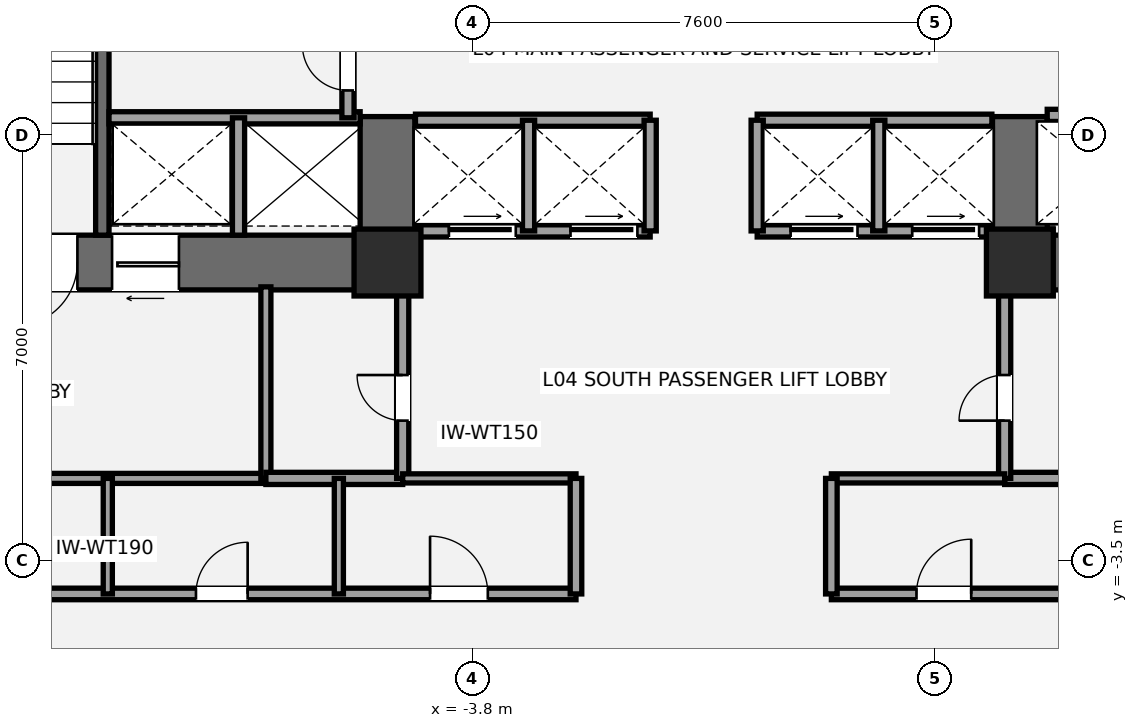
"""IFC4 building model, lengths in metres.
Left out: names, types, materials, properties, quantities, classifications, styles, units other than length and angle.
Written with IfcOpenShell. Run it as: python <this file> out.ifc"""

import sys

from ifc_helpers import new_model, si_unit, direction, frame, frame_2d, origin, origin_2d, place, context, subcontext, project, spatial, rectangle, extrude, element, fill, save


model = new_model("IFC4")
c1 = context("Model", 3, precision=1e-05, world=origin(), true_north=direction((0.0, 1.0)))
c2 = subcontext(c1, "Body", "Model", "MODEL_VIEW")
j1 = project(units=[si_unit("LENGTHUNIT", "METRE"), si_unit("PLANEANGLEUNIT", "RADIAN")], contexts=[c1])
p1 = place(None, origin())
s1 = spatial("IfcSite", under=j1, at=p1, CompositionType="ELEMENT")
p2 = place(p1, origin())
s2 = spatial("IfcBuilding", under=s1, at=p2, CompositionType="ELEMENT")
p3 = place(p2, frame((0.0, 0.0, 18.6)))
s3 = spatial("IfcBuildingStorey", under=s2, at=p3, CompositionType="ELEMENT", Elevation=18.6)
p4 = place(p3, frame((-4.75, 1.4, 0.0), z_axis=(0.0, 0.0, 1.0), x_axis=(-1.0, 0.0, 0.0)))
e1 = element("IfcWall", 1, at=p4, inside=s3, PredefinedType="SHEAR", context=c2, shape_type="SweptSolid", body=[
    extrude(rectangle(XDim=9.3, YDim=0.9, at=frame_2d((4.65, 0.0))), origin(), (0.0, 0.0, 1.0), 4.2),
])
p5 = place(p4, frame((5.55, 0.0, 0.0)))
e2 = element("IfcOpeningElement", 2, at=p5, cuts=e1, PredefinedType="OPENING", context=c2, shape_type="SweptSolid", body=[
    extrude(rectangle(XDim=1.05, YDim=2.15, at=frame_2d((0.525, 1.075))), frame((0.0, 0.46, 0.0), z_axis=(0.0, -1.0, 0.0), x_axis=(1.0, 0.0, 0.0)), (0.0, 0.0, 1.0), 0.92),
])
p6 = place(p4, frame((3.88, 0.0, 0.0)))
e3 = element("IfcOpeningElement", 3, at=p6, cuts=e1, PredefinedType="OPENING", context=c2, shape_type="SweptSolid", body=[
    extrude(rectangle(XDim=1.1, YDim=2.2, at=frame_2d((0.55, 1.1))), frame((0.0, 0.46, 0.0), z_axis=(0.0, -1.0, 0.0), x_axis=(1.0, 0.0, 0.0)), (0.0, 0.0, 1.0), 0.92),
])
p7 = place(p3, frame((-5.2, 0.95, 0.0), z_axis=(0.0, 0.0, 1.0), x_axis=(0.0, 1.0, 0.0)))
e4 = element("IfcWall", 4, at=p7, inside=s3, PredefinedType="SHEAR", context=c2, shape_type="SweptSolid", body=[
    extrude(rectangle(XDim=2.85, YDim=0.9, at=frame_2d((1.425, 0.0))), origin(), (0.0, 0.0, 1.0), 4.2),
])
p8 = place(p3, frame((-9.89, 1.85, 0.0), z_axis=(0.0, 0.0, 1.0), x_axis=(0.0, 1.0, 0.0)))
e5 = element("IfcWall", 5, at=p8, inside=s3, PredefinedType="SHEAR", context=c2, shape_type="SweptSolid", body=[
    extrude(rectangle(XDim=7.15, YDim=0.22, at=frame_2d((3.575, 0.0))), origin(), (0.0, 0.0, 1.0), 4.2),
])
p9 = place(p3, frame((14.05, 1.4, 0.0), z_axis=(0.0, 0.0, 1.0), x_axis=(-1.0, 0.0, 0.0)))
e6 = element("IfcWall", 6, at=p9, inside=s3, PredefinedType="SHEAR", context=c2, shape_type="SweptSolid", body=[
    extrude(rectangle(XDim=9.3, YDim=0.9, at=frame_2d((4.65, 0.0))), origin(), (0.0, 0.0, 1.0), 4.2),
])
p10 = place(p9, frame((2.7, 0.0, 0.0)))
e7 = element("IfcOpeningElement", 7, at=p10, cuts=e6, PredefinedType="OPENING", context=c2, shape_type="SweptSolid", body=[
    extrude(rectangle(XDim=1.05, YDim=2.15, at=frame_2d((0.525, 1.075))), frame((0.0, 0.46, 0.0), z_axis=(0.0, -1.0, 0.0), x_axis=(1.0, 0.0, 0.0)), (0.0, 0.0, 1.0), 0.92),
])
p11 = place(p9, frame((4.7, 0.0, 0.0)))
e8 = element("IfcOpeningElement", 8, at=p11, cuts=e6, PredefinedType="OPENING", context=c2, shape_type="SweptSolid", body=[
    extrude(rectangle(XDim=1.1, YDim=2.2, at=frame_2d((0.55, 1.1))), frame((0.0, 0.46, 0.0), z_axis=(0.0, -1.0, 0.0), x_axis=(1.0, 0.0, 0.0)), (0.0, 0.0, 1.0), 0.92),
])
p12 = place(p3, frame((5.2, 0.95, 0.0), z_axis=(0.0, 0.0, 1.0), x_axis=(0.0, 1.0, 0.0)))
e9 = element("IfcWall", 9, at=p12, inside=s3, PredefinedType="SHEAR", context=c2, shape_type="SweptSolid", body=[
    extrude(rectangle(XDim=2.85, YDim=0.9, at=frame_2d((1.425, 0.0))), origin(), (0.0, 0.0, 1.0), 4.2),
])
for number, where, z_axis, x_axis in (
    (10, (-5.2, 1.4, 0.0), (0.0, 0.0, 1.0), (1.0, 0.0, 0.0)),
    (11, (5.2, 1.4, 0.0), (0.0, 0.0, 1.0), (1.0, 0.0, 0.0)),
):
    element("IfcColumn", number, at=place(p3, frame(where, z_axis=z_axis, x_axis=x_axis)), inside=s3, PredefinedType="COLUMN", context=c2, shape_type="SweptSolid", body=[
        extrude(rectangle(XDim=1.1, YDim=1.1, at=origin_2d()), origin(), (0.0, 0.0, 1.0), 4.2),
    ])
p13 = place(p3, frame((-13.45, -2.15, 0.0), z_axis=(0.0, 0.0, 1.0), x_axis=(1.0, 0.0, 0.0)))
e12 = element("IfcWall", 12, at=p13, inside=s3, PredefinedType="PARTITIONING", context=c2, shape_type="SweptSolid", body=[
    extrude(rectangle(XDim=6.25, YDim=0.165, at=frame_2d((3.125, 0.0))), origin(), (0.0, 0.0, 1.0), 3.98),
])
p14 = place(p3, frame((-7.2, -2.15, 0.0), z_axis=(0.0, 0.0, 1.0), x_axis=(0.0, 1.0, 0.0)))
e13 = element("IfcWall", 13, at=p14, inside=s3, PredefinedType="PARTITIONING", context=c2, shape_type="SweptSolid", body=[
    extrude(rectangle(XDim=3.15, YDim=0.165, at=frame_2d((1.575, 0.0))), origin(), (0.0, 0.0, 1.0), 3.98),
])
p15 = place(p3, frame((-7.2, -2.15, 0.0), z_axis=(0.0, 0.0, 1.0), x_axis=(1.0, 0.0, 0.0)))
e14 = element("IfcWall", 14, at=p15, inside=s3, PredefinedType="SOLIDWALL", context=c2, shape_type="SweptSolid", body=[
    extrude(rectangle(XDim=2.25, YDim=0.2, at=frame_2d((1.125, 0.0))), origin(), (0.0, 0.0, 1.0), 3.98),
])
p16 = place(p3, frame((-4.95, -2.15, 0.0), z_axis=(0.0, 0.0, 1.0), x_axis=(0.0, 1.0, 0.0)))
e15 = element("IfcWall", 15, at=p16, inside=s3, PredefinedType="SOLIDWALL", context=c2, shape_type="SweptSolid", body=[
    extrude(rectangle(XDim=3.15, YDim=0.2, at=frame_2d((1.575, 0.0))), origin(), (0.0, 0.0, 1.0), 3.348),
])
p17 = place(p16, frame((0.95, 0.0, 0.0)))
e16 = element("IfcOpeningElement", 16, at=p17, cuts=e15, PredefinedType="OPENING", context=c2, shape_type="SweptSolid", body=[
    extrude(rectangle(XDim=0.75, YDim=2.1, at=frame_2d((0.375, 1.05))), frame((0.0, 0.11, 0.0), z_axis=(0.0, -1.0, 0.0), x_axis=(1.0, 0.0, 0.0)), (0.0, 0.0, 1.0), 0.22),
])
p18 = place(p3, frame((4.95, -2.15, 0.0), z_axis=(0.0, 0.0, 1.0), x_axis=(1.0, 0.0, 0.0)))
e17 = element("IfcWall", 17, at=p18, inside=s3, PredefinedType="SOLIDWALL", context=c2, shape_type="SweptSolid", body=[
    extrude(rectangle(XDim=2.25, YDim=0.2, at=frame_2d((1.125, 0.0))), origin(), (0.0, 0.0, 1.0), 3.98),
])
p19 = place(p3, frame((4.95, -2.15, 0.0), z_axis=(0.0, 0.0, 1.0), x_axis=(0.0, 1.0, 0.0)))
e18 = element("IfcWall", 18, at=p19, inside=s3, PredefinedType="SOLIDWALL", context=c2, shape_type="SweptSolid", body=[
    extrude(rectangle(XDim=3.15, YDim=0.2, at=frame_2d((1.575, 0.0))), origin(), (0.0, 0.0, 1.0), 3.348),
])
p20 = place(p19, frame((0.95, 0.0, 0.0)))
e19 = element("IfcOpeningElement", 19, at=p20, cuts=e18, PredefinedType="OPENING", context=c2, shape_type="SweptSolid", body=[
    extrude(rectangle(XDim=0.75, YDim=2.1, at=frame_2d((0.375, 1.05))), frame((0.0, 0.11, 0.0), z_axis=(0.0, -1.0, 0.0), x_axis=(1.0, 0.0, 0.0)), (0.0, 0.0, 1.0), 0.22),
])
p21 = place(p3, frame((-9.78, 3.78, 0.0), z_axis=(0.0, 0.0, 1.0), x_axis=(1.0, 0.0, 0.0)))
e20 = element("IfcWall", 20, at=p21, inside=s3, PredefinedType="SOLIDWALL", context=c2, shape_type="SweptSolid", body=[
    extrude(rectangle(XDim=4.13, YDim=0.2, at=frame_2d((2.065, 0.0))), origin(), (0.0, 0.0, 1.0), 3.98),
])
p22 = place(p3, frame((-7.65, 1.85, 0.0), z_axis=(0.0, 0.0, 1.0), x_axis=(0.0, 1.0, 0.0)))
e21 = element("IfcWall", 21, at=p22, inside=s3, PredefinedType="SOLIDWALL", context=c2, shape_type="SweptSolid", body=[
    extrude(rectangle(XDim=1.93, YDim=0.2, at=frame_2d((0.965, 0.0))), origin(), (0.0, 0.0, 1.0), 3.98),
])
p23 = place(p3, frame((-5.85, 3.78, 0.0), z_axis=(0.0, 0.0, 1.0), x_axis=(0.0, 1.0, 0.0)))
e22 = element("IfcWall", 22, at=p23, inside=s3, PredefinedType="SOLIDWALL", context=c2, shape_type="SweptSolid", body=[
    extrude(rectangle(XDim=1.69, YDim=0.2, at=frame_2d((0.845, 0.0))), origin(), (0.0, 0.0, 1.0), 3.98),
])
p24 = place(p23, frame((0.45, 0.0, 0.0)))
e23 = element("IfcOpeningElement", 23, at=p24, cuts=e22, PredefinedType="OPENING", context=c2, shape_type="SweptSolid", body=[
    extrude(rectangle(XDim=0.75, YDim=2.1, at=frame_2d((0.375, 1.05))), frame((0.0, 0.11, 0.0), z_axis=(0.0, -1.0, 0.0), x_axis=(1.0, 0.0, 0.0)), (0.0, 0.0, 1.0), 0.22),
])
p25 = place(p3, frame((5.65, 3.82, 0.0), z_axis=(0.0, 0.0, 1.0), x_axis=(1.0, 0.0, 0.0)))
e24 = element("IfcWall", 24, at=p25, inside=s3, PredefinedType="SOLIDWALL", context=c2, shape_type="SweptSolid", body=[
    extrude(rectangle(XDim=4.13, YDim=0.2, at=frame_2d((2.065, 0.0))), origin(), (0.0, 0.0, 1.0), 3.98),
])
p26 = place(p25, frame((0.65, 0.0, 0.0)))
e25 = element("IfcOpeningElement", 25, at=p26, cuts=e24, PredefinedType="OPENING", context=c2, shape_type="SweptSolid", body=[
    extrude(rectangle(XDim=1.2, YDim=2.2, at=frame_2d((0.6, 1.1))), frame((0.0, 0.11, 0.0), z_axis=(0.0, -1.0, 0.0), x_axis=(1.0, 0.0, 0.0)), (0.0, 0.0, 1.0), 0.22),
])
p27 = place(p3, frame((-4.74, 1.92, 0.0), z_axis=(0.0, 0.0, 1.0), x_axis=(1.0, 0.0, 0.0)))
e26 = element("IfcWall", 26, at=p27, inside=s3, PredefinedType="SOLIDWALL", context=c2, shape_type="SweptSolid", body=[
    extrude(rectangle(XDim=3.86, YDim=0.2, at=frame_2d((1.93, 0.0))), origin(), (0.0, 0.0, 1.0), 2.97),
])
p28 = place(p27, frame((0.55, 0.0, 0.0)))
e27 = element("IfcOpeningElement", 27, at=p28, cuts=e26, PredefinedType="OPENING", context=c2, shape_type="SweptSolid", body=[
    extrude(rectangle(XDim=1.1, YDim=2.2, at=frame_2d((0.55, 1.1))), frame((0.0, 0.11, 0.0), z_axis=(0.0, -1.0, 0.0), x_axis=(1.0, 0.0, 0.0)), (0.0, 0.0, 1.0), 0.22),
])
p29 = place(p27, frame((2.55, 0.0, 0.0)))
e28 = element("IfcOpeningElement", 28, at=p29, cuts=e26, PredefinedType="OPENING", context=c2, shape_type="SweptSolid", body=[
    extrude(rectangle(XDim=1.1, YDim=2.2, at=frame_2d((0.55, 1.1))), frame((0.0, 0.11, 0.0), z_axis=(0.0, -1.0, 0.0), x_axis=(1.0, 0.0, 0.0)), (0.0, 0.0, 1.0), 0.22),
])
p30 = place(p3, frame((0.88, 1.92, 0.0), z_axis=(0.0, 0.0, 1.0), x_axis=(1.0, 0.0, 0.0)))
e29 = element("IfcWall", 29, at=p30, inside=s3, PredefinedType="SOLIDWALL", context=c2, shape_type="SweptSolid", body=[
    extrude(rectangle(XDim=3.86, YDim=0.2, at=frame_2d((1.93, 0.0))), origin(), (0.0, 0.0, 1.0), 2.97),
])
p31 = place(p30, frame((0.55, 0.0, 0.0)))
e30 = element("IfcOpeningElement", 30, at=p31, cuts=e29, PredefinedType="OPENING", context=c2, shape_type="SweptSolid", body=[
    extrude(rectangle(XDim=1.1, YDim=2.2, at=frame_2d((0.55, 1.1))), frame((0.0, 0.11, 0.0), z_axis=(0.0, -1.0, 0.0), x_axis=(1.0, 0.0, 0.0)), (0.0, 0.0, 1.0), 0.22),
])
p32 = place(p30, frame((2.55, 0.0, 0.0)))
e31 = element("IfcOpeningElement", 31, at=p32, cuts=e29, PredefinedType="OPENING", context=c2, shape_type="SweptSolid", body=[
    extrude(rectangle(XDim=1.1, YDim=2.2, at=frame_2d((0.55, 1.1))), frame((0.0, 0.11, 0.0), z_axis=(0.0, -1.0, 0.0), x_axis=(1.0, 0.0, 0.0)), (0.0, 0.0, 1.0), 0.22),
])
for number, where, z_axis, x_axis in (
    (32, (-4.74, 3.74, 0.0), (0.0, 0.0, 1.0), (1.0, 0.0, 0.0)),
    (33, (0.88, 3.74, 0.0), (0.0, 0.0, 1.0), (1.0, 0.0, 0.0)),
):
    element("IfcWall", number, at=place(p3, frame(where, z_axis=z_axis, x_axis=x_axis)), inside=s3, PredefinedType="SOLIDWALL", context=c2, shape_type="SweptSolid", body=[
        extrude(rectangle(XDim=3.86, YDim=0.2, at=frame_2d((1.93, 0.0))), origin(), (0.0, 0.0, 1.0), 3.98),
    ])
for number, where, z_axis, x_axis in (
    (34, (-2.88, 1.92, 0.0), (0.0, 0.0, 1.0), (0.0, 1.0, 0.0)),
    (35, (2.88, 1.92, 0.0), (0.0, 0.0, 1.0), (0.0, 1.0, 0.0)),
    (36, (-0.88, 1.92, 0.0), (0.0, 0.0, 1.0), (0.0, 1.0, 0.0)),
    (37, (0.88, 1.92, 0.0), (0.0, 0.0, 1.0), (0.0, 1.0, 0.0)),
):
    element("IfcWall", number, at=place(p3, frame(where, z_axis=z_axis, x_axis=x_axis)), inside=s3, PredefinedType="SOLIDWALL", context=c2, shape_type="SweptSolid", body=[
        extrude(rectangle(XDim=1.82, YDim=0.2, at=frame_2d((0.91, 0.0))), origin(), (0.0, 0.0, 1.0), 3.98),
    ])
p33 = place(p3, frame((-13.45, -4.05, 0.0), z_axis=(0.0, 0.0, 1.0), x_axis=(1.0, 0.0, 0.0)))
e38 = element("IfcWall", 38, at=p33, inside=s3, PredefinedType="PLUMBINGWALL", context=c2, shape_type="SweptSolid", body=[
    extrude(rectangle(XDim=11.35, YDim=0.19, at=frame_2d((5.675, 0.0))), origin(), (0.0, 0.0, 1.0), 3.507),
])
p34 = place(p33, frame((1.25, 0.0, 0.0)))
e39 = element("IfcOpeningElement", 39, at=p34, cuts=e38, PredefinedType="OPENING", context=c2, shape_type="SweptSolid", body=[
    extrude(rectangle(XDim=0.85, YDim=2.1, at=frame_2d((0.425, 1.05))), frame((0.0, 0.105, 0.0), z_axis=(0.0, -1.0, 0.0), x_axis=(1.0, 0.0, 0.0)), (0.0, 0.0, 1.0), 0.21),
])
p35 = place(p33, frame((5.1, 0.0, 0.0)))
e40 = element("IfcOpeningElement", 40, at=p35, cuts=e38, PredefinedType="OPENING", context=c2, shape_type="SweptSolid", body=[
    extrude(rectangle(XDim=0.85, YDim=2.1, at=frame_2d((0.425, 1.05))), frame((0.0, 0.105, 0.0), z_axis=(0.0, -1.0, 0.0), x_axis=(1.0, 0.0, 0.0)), (0.0, 0.0, 1.0), 0.21),
])
p36 = place(p33, frame((8.95, 0.0, 0.0)))
e41 = element("IfcOpeningElement", 41, at=p36, cuts=e38, PredefinedType="OPENING", context=c2, shape_type="SweptSolid", body=[
    extrude(rectangle(XDim=0.95, YDim=2.15, at=frame_2d((0.475, 1.075))), frame((0.0, 0.105, 0.0), z_axis=(0.0, -1.0, 0.0), x_axis=(1.0, 0.0, 0.0)), (0.0, 0.0, 1.0), 0.21),
])
p37 = place(p3, frame((-4.95, -2.15, 0.0), z_axis=(0.0, 0.0, 1.0), x_axis=(1.0, 0.0, 0.0)))
e42 = element("IfcWall", 42, at=p37, inside=s3, PredefinedType="PLUMBINGWALL", context=c2, shape_type="SweptSolid", body=[
    extrude(rectangle(XDim=2.85, YDim=0.15, at=frame_2d((1.425, 0.0))), origin(), (0.0, 0.0, 1.0), 3.98),
])
p38 = place(p3, frame((-2.1, -4.05, 0.0), z_axis=(0.0, 0.0, 1.0), x_axis=(0.0, 1.0, 0.0)))
e43 = element("IfcWall", 43, at=p38, inside=s3, PredefinedType="PLUMBINGWALL", context=c2, shape_type="SweptSolid", body=[
    extrude(rectangle(XDim=1.9, YDim=0.19, at=frame_2d((0.95, 0.0))), origin(), (0.0, 0.0, 1.0), 3.98),
])
p39 = place(p3, frame((-9.8, -4.05, 0.0), z_axis=(0.0, 0.0, 1.0), x_axis=(0.0, 1.0, 0.0)))
e44 = element("IfcWall", 44, at=p39, inside=s3, PredefinedType="PLUMBINGWALL", context=c2, shape_type="SweptSolid", body=[
    extrude(rectangle(XDim=1.9, YDim=0.15, at=frame_2d((0.95, 0.0))), origin(), (0.0, 0.0, 1.0), 3.98),
])
p40 = place(p3, frame((-6.0, -4.05, 0.0), z_axis=(0.0, 0.0, 1.0), x_axis=(0.0, 1.0, 0.0)))
e45 = element("IfcWall", 45, at=p40, inside=s3, PredefinedType="PLUMBINGWALL", context=c2, shape_type="SweptSolid", body=[
    extrude(rectangle(XDim=1.9, YDim=0.15, at=frame_2d((0.95, 0.0))), origin(), (0.0, 0.0, 1.0), 3.348),
])
p41 = place(p3, frame((2.1, -4.05, 0.0), z_axis=(0.0, 0.0, 1.0), x_axis=(1.0, 0.0, 0.0)))
e46 = element("IfcWall", 46, at=p41, inside=s3, PredefinedType="PLUMBINGWALL", context=c2, shape_type="SweptSolid", body=[
    extrude(rectangle(XDim=11.35, YDim=0.19, at=frame_2d((5.675, 0.0))), origin(), (0.0, 0.0, 1.0), 3.507),
])
p42 = place(p41, frame((1.4, 0.0, 0.0)))
e47 = element("IfcOpeningElement", 47, at=p42, cuts=e46, PredefinedType="OPENING", context=c2, shape_type="SweptSolid", body=[
    extrude(rectangle(XDim=0.9, YDim=2.1, at=frame_2d((0.45, 1.05))), frame((0.0, 0.105, 0.0), z_axis=(0.0, -1.0, 0.0), x_axis=(1.0, 0.0, 0.0)), (0.0, 0.0, 1.0), 0.21),
])
p43 = place(p41, frame((5.3, 0.0, 0.0)))
e48 = element("IfcOpeningElement", 48, at=p43, cuts=e46, PredefinedType="OPENING", context=c2, shape_type="SweptSolid", body=[
    extrude(rectangle(XDim=0.9, YDim=2.1, at=frame_2d((0.45, 1.05))), frame((0.0, 0.105, 0.0), z_axis=(0.0, -1.0, 0.0), x_axis=(1.0, 0.0, 0.0)), (0.0, 0.0, 1.0), 0.21),
])
p44 = place(p41, frame((9.1, 0.0, 0.0)))
e49 = element("IfcOpeningElement", 49, at=p44, cuts=e46, PredefinedType="OPENING", context=c2, shape_type="SweptSolid", body=[
    extrude(rectangle(XDim=0.9, YDim=2.1, at=frame_2d((0.45, 1.05))), frame((0.0, 0.105, 0.0), z_axis=(0.0, -1.0, 0.0), x_axis=(1.0, 0.0, 0.0)), (0.0, 0.0, 1.0), 0.21),
])
p45 = place(p3, frame((2.1, -2.15, 0.0), z_axis=(0.0, 0.0, 1.0), x_axis=(1.0, 0.0, 0.0)))
e50 = element("IfcWall", 50, at=p45, inside=s3, PredefinedType="PLUMBINGWALL", context=c2, shape_type="SweptSolid", body=[
    extrude(rectangle(XDim=2.85, YDim=0.15, at=frame_2d((1.425, 0.0))), origin(), (0.0, 0.0, 1.0), 3.98),
])
p46 = place(p3, frame((2.1, -4.05, 0.0), z_axis=(0.0, 0.0, 1.0), x_axis=(0.0, 1.0, 0.0)))
e51 = element("IfcWall", 51, at=p46, inside=s3, PredefinedType="PLUMBINGWALL", context=c2, shape_type="SweptSolid", body=[
    extrude(rectangle(XDim=1.9, YDim=0.19, at=frame_2d((0.95, 0.0))), origin(), (0.0, 0.0, 1.0), 3.98),
])
p47 = place(p5, origin())
e52 = element("IfcDoor", 52, at=p47, inside=s3, OperationType="SINGLE_SWING_RIGHT", PredefinedType="DOOR", context=c2, shape_type="SweptSolid", body=[
    extrude(rectangle(XDim=1.05, YDim=2.15, at=frame_2d((0.525, 1.075))), frame((0.0, 0.025, 0.0), z_axis=(0.0, -1.0, 0.0), x_axis=(1.0, 0.0, 0.0)), (0.0, 0.0, 1.0), 0.05),
])
fill(e2, e52)
p48 = place(p17, origin())
e53 = element("IfcDoor", 53, at=p48, inside=s3, OperationType="SINGLE_SWING_RIGHT", PredefinedType="DOOR", context=c2, shape_type="SweptSolid", body=[
    extrude(rectangle(XDim=0.75, YDim=2.1, at=frame_2d((0.375, 1.05))), frame((0.0, 0.025, 0.0), z_axis=(0.0, -1.0, 0.0), x_axis=(1.0, 0.0, 0.0)), (0.0, 0.0, 1.0), 0.05),
])
fill(e16, e53)
p49 = place(p20, origin())
e54 = element("IfcDoor", 54, at=p49, inside=s3, OperationType="SINGLE_SWING_LEFT", PredefinedType="DOOR", context=c2, shape_type="SweptSolid", body=[
    extrude(rectangle(XDim=0.75, YDim=2.1, at=frame_2d((0.375, 1.05))), frame((0.0, 0.025, 0.0), z_axis=(0.0, -1.0, 0.0), x_axis=(1.0, 0.0, 0.0)), (0.0, 0.0, 1.0), 0.05),
])
fill(e19, e54)
p50 = place(p6, origin())
e55 = element("IfcDoor", 55, at=p50, inside=s3, OperationType="SLIDING_TO_LEFT", PredefinedType="DOOR", context=c2, shape_type="SweptSolid", body=[
    extrude(rectangle(XDim=1.1, YDim=2.2, at=frame_2d((0.55, 1.1))), frame((0.0, 0.025, 0.0), z_axis=(0.0, -1.0, 0.0), x_axis=(1.0, 0.0, 0.0)), (0.0, 0.0, 1.0), 0.05),
])
fill(e3, e55)
p51 = place(p24, origin())
e56 = element("IfcDoor", 56, at=p51, inside=s3, OperationType="SINGLE_SWING_RIGHT", PredefinedType="DOOR", context=c2, shape_type="SweptSolid", body=[
    extrude(rectangle(XDim=0.75, YDim=2.1, at=frame_2d((0.375, 1.05))), frame((0.0, 0.025, 0.0), z_axis=(0.0, -1.0, 0.0), x_axis=(1.0, 0.0, 0.0)), (0.0, 0.0, 1.0), 0.05),
])
fill(e23, e56)
p52 = place(p28, origin())
e57 = element("IfcDoor", 57, at=p52, inside=s3, OperationType="SLIDING_TO_LEFT", PredefinedType="DOOR", context=c2, shape_type="SweptSolid", body=[
    extrude(rectangle(XDim=1.1, YDim=2.2, at=frame_2d((0.55, 1.1))), frame((0.0, 0.025, 0.0), z_axis=(0.0, -1.0, 0.0), x_axis=(1.0, 0.0, 0.0)), (0.0, 0.0, 1.0), 0.05),
])
fill(e27, e57)
p53 = place(p29, origin())
e58 = element("IfcDoor", 58, at=p53, inside=s3, OperationType="SLIDING_TO_LEFT", PredefinedType="DOOR", context=c2, shape_type="SweptSolid", body=[
    extrude(rectangle(XDim=1.1, YDim=2.2, at=frame_2d((0.55, 1.1))), frame((0.0, 0.025, 0.0), z_axis=(0.0, -1.0, 0.0), x_axis=(1.0, 0.0, 0.0)), (0.0, 0.0, 1.0), 0.05),
])
fill(e28, e58)
p54 = place(p31, origin())
e59 = element("IfcDoor", 59, at=p54, inside=s3, OperationType="SLIDING_TO_LEFT", PredefinedType="DOOR", context=c2, shape_type="SweptSolid", body=[
    extrude(rectangle(XDim=1.1, YDim=2.2, at=frame_2d((0.55, 1.1))), frame((0.0, 0.025, 0.0), z_axis=(0.0, -1.0, 0.0), x_axis=(1.0, 0.0, 0.0)), (0.0, 0.0, 1.0), 0.05),
])
fill(e30, e59)
p55 = place(p32, origin())
e60 = element("IfcDoor", 60, at=p55, inside=s3, OperationType="SLIDING_TO_LEFT", PredefinedType="DOOR", context=c2, shape_type="SweptSolid", body=[
    extrude(rectangle(XDim=1.1, YDim=2.2, at=frame_2d((0.55, 1.1))), frame((0.0, 0.025, 0.0), z_axis=(0.0, -1.0, 0.0), x_axis=(1.0, 0.0, 0.0)), (0.0, 0.0, 1.0), 0.05),
])
fill(e31, e60)
p56 = place(p35, origin())
e61 = element("IfcDoor", 61, at=p56, inside=s3, OperationType="SINGLE_SWING_RIGHT", PredefinedType="DOOR", context=c2, shape_type="SweptSolid", body=[
    extrude(rectangle(XDim=0.85, YDim=2.1, at=frame_2d((0.425, 1.05))), frame((0.0, 0.025, 0.0), z_axis=(0.0, -1.0, 0.0), x_axis=(1.0, 0.0, 0.0)), (0.0, 0.0, 1.0), 0.05),
])
fill(e40, e61)
p57 = place(p36, origin())
e62 = element("IfcDoor", 62, at=p57, inside=s3, OperationType="SINGLE_SWING_LEFT", PredefinedType="DOOR", context=c2, shape_type="SweptSolid", body=[
    extrude(rectangle(XDim=0.95, YDim=2.15, at=frame_2d((0.475, 1.075))), frame((0.0, 0.025, 0.0), z_axis=(0.0, -1.0, 0.0), x_axis=(1.0, 0.0, 0.0)), (0.0, 0.0, 1.0), 0.05),
])
fill(e41, e62)
p58 = place(p42, origin())
e63 = element("IfcDoor", 63, at=p58, inside=s3, OperationType="SINGLE_SWING_RIGHT", PredefinedType="DOOR", context=c2, shape_type="SweptSolid", body=[
    extrude(rectangle(XDim=0.9, YDim=2.1, at=frame_2d((0.45, 1.05))), frame((0.0, 0.025, 0.0), z_axis=(0.0, -1.0, 0.0), x_axis=(1.0, 0.0, 0.0)), (0.0, 0.0, 1.0), 0.05),
])
fill(e47, e63)
save(model, sys.argv[1])
